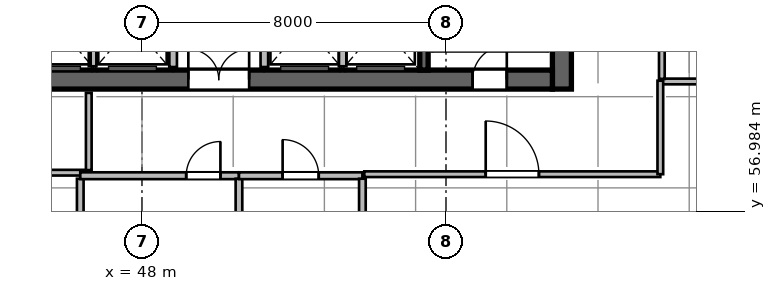
"""IFC4 building model, lengths in metres.
Left out: names, types, materials, properties, quantities, classifications, styles, units other than length and angle.
Written with IfcOpenShell. Run it as: python <this file> out.ifc"""

import sys

from ifc_helpers import new_model, si_unit, direction, frame, frame_2d, origin, place, context, subcontext, project, spatial, rectangle, extrude, source, transform, mapped, element, fill, save


model = new_model("IFC4")
c1 = context("Model", 3, precision=1e-05, world=origin(), true_north=direction((0.0, 1.0)))
c2 = subcontext(c1, "Body", "Model", "MODEL_VIEW")
j1 = project(units=[si_unit("LENGTHUNIT", "METRE"), si_unit("PLANEANGLEUNIT", "RADIAN")], contexts=[c1])
p1 = place(None, origin())
s1 = spatial("IfcSite", under=j1, at=p1, CompositionType="ELEMENT")
p2 = place(p1, origin())
s2 = spatial("IfcBuilding", under=s1, at=p2, CompositionType="ELEMENT")
p3 = place(p2, frame((0.0, 0.0, 91.2)))
s3 = spatial("IfcBuildingStorey", under=s2, at=p3, CompositionType="ELEMENT", Elevation=91.2)
m1 = source(origin(), c2, "Body", "SweptSolid", [
    extrude(rectangle(XDim=12.0, YDim=0.5, at=frame_2d((6.0, 0.0))), origin(), (0.0, 0.0, 1.0), 4.8),
])
p4 = place(p3, frame((59.05, 60.2, 0.0), z_axis=(0.0, 0.0, 1.0), x_axis=(0.0, 1.0, 0.0)))
e1 = element("IfcWall", 1, at=p4, inside=s3, PredefinedType="SHEAR", context=c2, shape_type="MappedRepresentation", body=[
    mapped(m1, transform((0.0, 0.0, 0.0), scale=1.0)),
])
m2 = source(origin(), c2, "Body", "SweptSolid", [
    extrude(rectangle(XDim=21.6, YDim=0.5, at=frame_2d((10.8, 0.0))), origin(), (0.0, 0.0, 1.0), 4.8),
])
p5 = place(p3, frame((37.2, 60.45, 0.0), z_axis=(0.0, 0.0, 1.0), x_axis=(1.0, 0.0, 0.0)))
e2 = element("IfcWall", 2, at=p5, inside=s3, PredefinedType="SHEAR", context=c2, shape_type="MappedRepresentation", body=[
    mapped(m2, transform((0.0, 0.0, 0.0), scale=1.0)),
])
p6 = place(p5, frame((1.1, 0.0, 0.0)))
e3 = element("IfcOpeningElement", 3, at=p6, cuts=e2, PredefinedType="OPENING", context=c2, shape_type="SweptSolid", body=[
    extrude(rectangle(XDim=1.15, YDim=2.15, at=frame_2d((0.575, 1.075))), frame((0.0, 0.26, 0.0), z_axis=(0.0, -1.0, 0.0), x_axis=(1.0, 0.0, 0.0)), (0.0, 0.0, 1.0), 0.52),
])
p7 = place(p5, frame((19.5, 0.0, 0.0)))
e4 = element("IfcOpeningElement", 4, at=p7, cuts=e2, PredefinedType="OPENING", context=c2, shape_type="SweptSolid", body=[
    extrude(rectangle(XDim=0.9, YDim=2.1, at=frame_2d((0.45, 1.05))), frame((0.0, 0.26, 0.0), z_axis=(0.0, -1.0, 0.0), x_axis=(1.0, 0.0, 0.0)), (0.0, 0.0, 1.0), 0.52),
])
p8 = place(p5, frame((12.02, 0.0, 0.0)))
e5 = element("IfcOpeningElement", 5, at=p8, cuts=e2, PredefinedType="OPENING", context=c2, shape_type="SweptSolid", body=[
    extrude(rectangle(XDim=1.6, YDim=2.15, at=frame_2d((0.8, 1.075))), frame((0.0, 0.26, 0.0), z_axis=(0.0, -1.0, 0.0), x_axis=(1.0, 0.0, 0.0)), (0.0, 0.0, 1.0), 0.52),
])
m3 = source(origin(), c2, "Body", "SweptSolid", [
    extrude(rectangle(XDim=11.0, YDim=0.22, at=frame_2d((5.5, 0.0))), origin(), (0.0, 0.0, 1.0), 4.8),
])
p9 = place(p3, frame((55.42, 60.7, 0.0), z_axis=(0.0, 0.0, 1.0), x_axis=(0.0, 1.0, 0.0)))
e6 = element("IfcWall", 6, at=p9, inside=s3, PredefinedType="SHEAR", context=c2, shape_type="MappedRepresentation", body=[
    mapped(m3, transform((0.0, 0.0, 0.0), scale=1.0)),
])
p10 = place(p9, frame((9.545, 0.0, 0.0)))
e7 = element("IfcOpeningElement", 7, at=p10, cuts=e6, PredefinedType="OPENING", context=c2, shape_type="SweptSolid", body=[
    extrude(rectangle(XDim=1.15, YDim=2.15, at=frame_2d((0.575, 1.075))), frame((0.0, 0.12, 0.0), z_axis=(0.0, -1.0, 0.0), x_axis=(1.0, 0.0, 0.0)), (0.0, 0.0, 1.0), 0.24),
])
m4 = source(origin(), c2, "Body", "SweptSolid", [
    extrude(rectangle(XDim=2.24, YDim=0.2, at=frame_2d((1.12, 0.0))), origin(), (0.0, 0.0, 1.0), 4.55),
])
for number, where, z_axis, x_axis in (
    (8, (48.82, 60.78, 0.0), (0.0, 0.0, 1.0), (0.0, 1.0, 0.0)),
    (9, (51.22, 60.78, 0.0), (0.0, 0.0, 1.0), (0.0, 1.0, 0.0)),
):
    element("IfcWall", number, at=place(p3, frame(where, z_axis=z_axis, x_axis=x_axis)), inside=s3, PredefinedType="SOLIDWALL", context=c2, shape_type="MappedRepresentation", body=[
        mapped(m4, transform((0.0, 0.0, 0.0), scale=1.0)),
    ])
m5 = source(origin(), c2, "Body", "SweptSolid", [
    extrude(rectangle(XDim=2.2, YDim=0.2, at=frame_2d((1.1, 0.0))), origin(), (0.0, 0.0, 1.0), 4.55),
])
for number, where, z_axis, x_axis in (
    (10, (46.7, 60.8, 0.0), (0.0, 0.0, 1.0), (0.0, 1.0, 0.0)),
    (11, (53.28, 60.8, 0.0), (0.0, 0.0, 1.0), (0.0, 1.0, 0.0)),
):
    element("IfcWall", number, at=place(p3, frame(where, z_axis=z_axis, x_axis=x_axis)), inside=s3, PredefinedType="SOLIDWALL", context=c2, shape_type="MappedRepresentation", body=[
        mapped(m5, transform((0.0, 0.0, 0.0), scale=1.0)),
    ])
m6 = source(origin(), c2, "Body", "SweptSolid", [
    extrude(rectangle(XDim=5.4, YDim=0.15, at=frame_2d((2.7, 0.0))), origin(), (0.0, 0.0, 1.0), 4.117),
])
p11 = place(p3, frame((41.2, 58.0, 0.0), z_axis=(0.0, 0.0, 1.0), x_axis=(1.0, 0.0, 0.0)))
e12 = element("IfcWall", 12, at=p11, inside=s3, PredefinedType="PARTITIONING", context=c2, shape_type="MappedRepresentation", body=[
    mapped(m6, transform((0.0, 0.0, 0.0), scale=1.0)),
])
p12 = place(p11, frame((2.25, 0.0, 0.0)))
e13 = element("IfcOpeningElement", 13, at=p12, cuts=e12, PredefinedType="OPENING", context=c2, shape_type="SweptSolid", body=[
    extrude(rectangle(XDim=0.9, YDim=2.08, at=frame_2d((0.45, 1.04))), frame((0.0, 0.085, 0.0), z_axis=(0.0, -1.0, 0.0), x_axis=(1.0, 0.0, 0.0)), (0.0, 0.0, 1.0), 0.17),
])
m7 = source(origin(), c2, "Body", "SweptSolid", [
    extrude(rectangle(XDim=2.033, YDim=0.15, at=frame_2d((1.016, 0.0))), origin(), (0.0, 0.0, 1.0), 4.55),
])
p13 = place(p3, frame((46.6, 58.067, 0.0), z_axis=(0.0, 0.0, 1.0), x_axis=(0.0, 1.0, 0.0)))
e14 = element("IfcWall", 14, at=p13, inside=s3, PredefinedType="PARTITIONING", context=c2, shape_type="MappedRepresentation", body=[
    mapped(m7, transform((0.0, 0.0, 0.0), scale=1.0)),
])
m8 = source(origin(), c2, "Body", "SweptSolid", [
    extrude(rectangle(XDim=3.763, YDim=0.175, at=frame_2d((1.881, 0.0))), origin(), (0.0, 0.0, 1.0), 4.55),
])
p14 = place(p3, frame((46.376, 54.079, 0.0), z_axis=(0.0, 0.0, 1.0), x_axis=(0.0, 1.0, 0.0)))
e15 = element("IfcWall", 15, at=p14, inside=s3, PredefinedType="PARTITIONING", context=c2, shape_type="MappedRepresentation", body=[
    mapped(m8, transform((0.0, 0.0, 0.0), scale=1.0)),
])
m9 = source(origin(), c2, "Body", "SweptSolid", [
    extrude(rectangle(XDim=4.176, YDim=0.18, at=frame_2d((2.088, 0.0))), origin(), (0.0, 0.0, 1.0), 4.55),
])
p15 = place(p3, frame((46.376, 57.92, 0.0), z_axis=(0.0, 0.0, 1.0), x_axis=(1.0, 0.0, 0.0)))
e16 = element("IfcWall", 16, at=p15, inside=s3, PredefinedType="PLUMBINGWALL", context=c2, shape_type="MappedRepresentation", body=[
    mapped(m9, transform((0.0, 0.0, 0.0), scale=1.0)),
])
p16 = place(p15, frame((2.788, 0.0, 0.0)))
e17 = element("IfcOpeningElement", 17, at=p16, cuts=e16, PredefinedType="OPENING", context=c2, shape_type="SweptSolid", body=[
    extrude(rectangle(XDim=0.9, YDim=2.08, at=frame_2d((0.45, 1.04))), frame((0.0, 0.1, 0.0), z_axis=(0.0, -1.0, 0.0), x_axis=(1.0, 0.0, 0.0)), (0.0, 0.0, 1.0), 0.2),
])
p17 = place(p3, frame((50.552, 54.079, 0.0), z_axis=(0.0, 0.0, 1.0), x_axis=(0.0, 1.0, 0.0)))
e18 = element("IfcWall", 18, at=p17, inside=s3, PredefinedType="PARTITIONING", context=c2, shape_type="MappedRepresentation", body=[
    mapped(m8, transform((0.0, 0.0, 0.0), scale=1.0)),
])
m10 = source(origin(), c2, "Body", "SweptSolid", [
    extrude(rectangle(XDim=3.248, YDim=0.18, at=frame_2d((1.624, 0.0))), origin(), (0.0, 0.0, 1.0), 4.55),
])
p18 = place(p3, frame((50.552, 57.92, 0.0), z_axis=(0.0, 0.0, 1.0), x_axis=(1.0, 0.0, 0.0)))
e19 = element("IfcWall", 19, at=p18, inside=s3, PredefinedType="PLUMBINGWALL", context=c2, shape_type="MappedRepresentation", body=[
    mapped(m10, transform((0.0, 0.0, 0.0), scale=1.0)),
])
p19 = place(p18, frame((1.149, 0.0, 0.0)))
e20 = element("IfcOpeningElement", 20, at=p19, cuts=e19, PredefinedType="OPENING", context=c2, shape_type="SweptSolid", body=[
    extrude(rectangle(XDim=0.95, YDim=2.12, at=frame_2d((0.475, 1.06))), frame((0.0, 0.1, 0.0), z_axis=(0.0, -1.0, 0.0), x_axis=(1.0, 0.0, 0.0)), (0.0, 0.0, 1.0), 0.2),
])
p20 = place(p3, frame((53.8, 54.079, 0.0), z_axis=(0.0, 0.0, 1.0), x_axis=(0.0, 1.0, 0.0)))
e21 = element("IfcWall", 21, at=p20, inside=s3, PredefinedType="PARTITIONING", context=c2, shape_type="MappedRepresentation", body=[
    mapped(m8, transform((0.0, 0.0, 0.0), scale=1.0)),
])
m11 = source(origin(), c2, "Body", "SweptSolid", [
    extrude(rectangle(XDim=7.32, YDim=0.15, at=frame_2d((3.66, 0.0))), origin(), (0.0, 0.0, 1.0), 4.55),
])
p21 = place(p3, frame((61.68, 60.4, 0.0), z_axis=(0.0, 0.0, 1.0), x_axis=(1.0, 0.0, 0.0)))
e22 = element("IfcWall", 22, at=p21, inside=s3, PredefinedType="PARTITIONING", context=c2, shape_type="MappedRepresentation", body=[
    mapped(m11, transform((0.0, 0.0, 0.0), scale=1.0)),
])
m12 = source(origin(), c2, "Body", "SweptSolid", [
    extrude(rectangle(XDim=5.065, YDim=0.15, at=frame_2d((2.532, 0.0))), origin(), (0.0, 0.0, 1.0), 4.55),
])
p22 = place(p3, frame((61.68, 60.468, 0.0), z_axis=(0.0, 0.0, 1.0), x_axis=(0.0, 1.0, 0.0)))
e23 = element("IfcWall", 23, at=p22, inside=s3, PredefinedType="PARTITIONING", context=c2, shape_type="MappedRepresentation", body=[
    mapped(m12, transform((0.0, 0.0, 0.0), scale=1.0)),
])
p23 = place(p22, frame((1.933, 0.0, 0.0)))
e24 = element("IfcOpeningElement", 24, at=p23, cuts=e23, PredefinedType="OPENING", context=c2, shape_type="SweptSolid", body=[
    extrude(rectangle(XDim=1.2, YDim=2.15, at=frame_2d((0.6, 1.075))), frame((0.0, 0.085, 0.0), z_axis=(0.0, -1.0, 0.0), x_axis=(1.0, 0.0, 0.0)), (0.0, 0.0, 1.0), 0.17),
])
m13 = source(origin(), c2, "Body", "SweptSolid", [
    extrude(rectangle(XDim=7.79, YDim=0.15, at=frame_2d((3.895, 0.0))), origin(), (0.0, 0.0, 1.0), 4.117),
])
p24 = place(p3, frame((53.85, 57.96, 0.0), z_axis=(0.0, 0.0, 1.0), x_axis=(1.0, 0.0, 0.0)))
e25 = element("IfcWall", 25, at=p24, inside=s3, PredefinedType="PARTITIONING", context=c2, shape_type="MappedRepresentation", body=[
    mapped(m13, transform((0.0, 0.0, 0.0), scale=1.0)),
])
p25 = place(p24, frame((3.195, 0.0, 0.0)))
e26 = element("IfcOpeningElement", 26, at=p25, cuts=e25, PredefinedType="OPENING", context=c2, shape_type="SweptSolid", body=[
    extrude(rectangle(XDim=1.4, YDim=2.15, at=frame_2d((0.7, 1.075))), frame((0.0, 0.085, 0.0), z_axis=(0.0, -1.0, 0.0), x_axis=(1.0, 0.0, 0.0)), (0.0, 0.0, 1.0), 0.17),
])
m14 = source(origin(), c2, "Body", "SweptSolid", [
    extrude(rectangle(XDim=2.46, YDim=0.15, at=frame_2d((1.23, 0.0))), origin(), (0.0, 0.0, 1.0), 4.55),
])
p26 = place(p3, frame((61.64, 57.96, 0.0), z_axis=(0.0, 0.0, 1.0), x_axis=(0.0, 1.0, 0.0)))
e27 = element("IfcWall", 27, at=p26, inside=s3, PredefinedType="PARTITIONING", context=c2, shape_type="MappedRepresentation", body=[
    mapped(m14, transform((0.0, 0.0, 0.0), scale=1.0)),
])
m15 = source(origin(), c2, "Body", "SweptSolid", [
    extrude(rectangle(XDim=0.9, YDim=2.1, at=frame_2d((0.45, 1.05))), frame((0.0, 0.025, 0.0), z_axis=(0.0, -1.0, 0.0), x_axis=(1.0, 0.0, 0.0)), (0.0, 0.0, 1.0), 0.05),
])
p27 = place(p7, origin())
e28 = element("IfcDoor", 28, at=p27, inside=s3, OperationType="SINGLE_SWING_RIGHT", PredefinedType="DOOR", context=c2, shape_type="MappedRepresentation", body=[
    mapped(m15, transform((0.0, 0.0, 0.0), scale=1.0)),
])
fill(e4, e28)
m16 = source(origin(), c2, "Body", "SweptSolid", [
    extrude(rectangle(XDim=1.6, YDim=2.15, at=frame_2d((0.8, 1.075))), frame((0.0, 0.025, 0.0), z_axis=(0.0, -1.0, 0.0), x_axis=(1.0, 0.0, 0.0)), (0.0, 0.0, 1.0), 0.05),
])
p28 = place(p8, origin())
e29 = element("IfcDoor", 29, at=p28, inside=s3, OperationType="DOUBLE_DOOR_SINGLE_SWING", PredefinedType="DOOR", context=c2, shape_type="MappedRepresentation", body=[
    mapped(m16, transform((0.0, 0.0, 0.0), scale=1.0)),
])
fill(e5, e29)
m17 = source(origin(), c2, "Body", "SweptSolid", [
    extrude(rectangle(XDim=0.9, YDim=2.08, at=frame_2d((0.45, 1.04))), frame((0.0, 0.025, 0.0), z_axis=(0.0, -1.0, 0.0), x_axis=(1.0, 0.0, 0.0)), (0.0, 0.0, 1.0), 0.05),
])
p29 = place(p16, origin())
e30 = element("IfcDoor", 30, at=p29, inside=s3, OperationType="SINGLE_SWING_RIGHT", PredefinedType="DOOR", context=c2, shape_type="MappedRepresentation", body=[
    mapped(m17, transform((0.0, 0.0, 0.0), scale=1.0)),
])
fill(e17, e30)
m18 = source(origin(), c2, "Body", "SweptSolid", [
    extrude(rectangle(XDim=0.95, YDim=2.12, at=frame_2d((0.475, 1.06))), frame((0.0, 0.025, 0.0), z_axis=(0.0, -1.0, 0.0), x_axis=(1.0, 0.0, 0.0)), (0.0, 0.0, 1.0), 0.05),
])
p30 = place(p19, origin())
e31 = element("IfcDoor", 31, at=p30, inside=s3, OperationType="SINGLE_SWING_LEFT", PredefinedType="DOOR", context=c2, shape_type="MappedRepresentation", body=[
    mapped(m18, transform((0.0, 0.0, 0.0), scale=1.0)),
])
fill(e20, e31)
m19 = source(origin(), c2, "Body", "SweptSolid", [
    extrude(rectangle(XDim=1.4, YDim=2.15, at=frame_2d((0.7, 1.075))), frame((0.0, 0.025, 0.0), z_axis=(0.0, -1.0, 0.0), x_axis=(1.0, 0.0, 0.0)), (0.0, 0.0, 1.0), 0.05),
])
p31 = place(p25, origin())
e32 = element("IfcDoor", 32, at=p31, inside=s3, OperationType="SINGLE_SWING_LEFT", PredefinedType="DOOR", context=c2, shape_type="MappedRepresentation", body=[
    mapped(m19, transform((0.0, 0.0, 0.0), scale=1.0)),
])
fill(e26, e32)
save(model, sys.argv[1])
